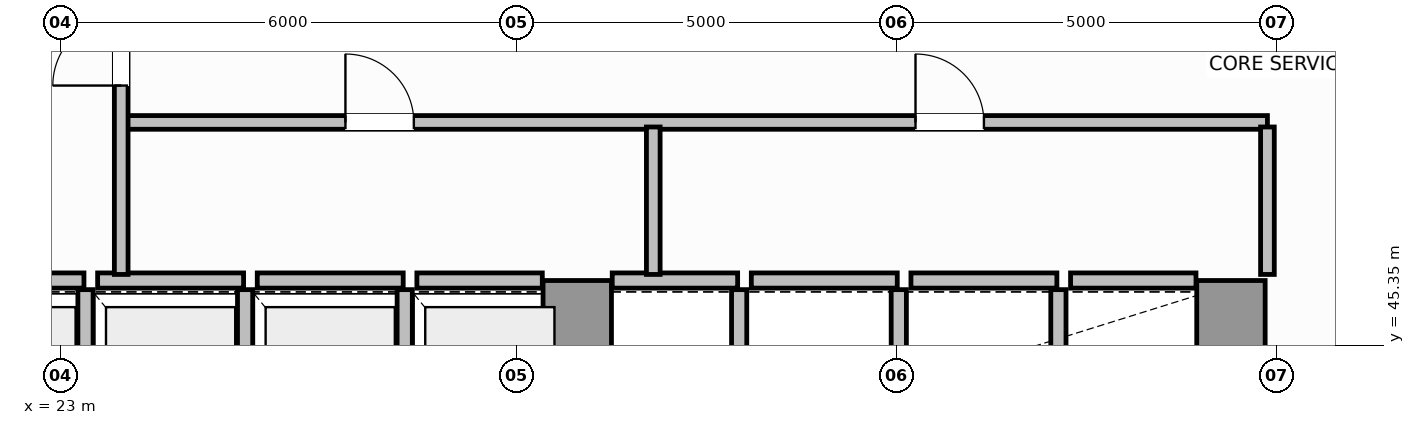
"""IFC4 building model, lengths in metres.
Left out: names, types, materials, properties, quantities, classifications, styles, units other than length and angle.
Written with IfcOpenShell. Run it as: python <this file> out.ifc"""

import sys

from ifc_helpers import new_model, si_unit, direction, frame, frame_2d, origin, place, context, subcontext, project, spatial, rectangle, extrude, source, transform, mapped, element, fill, save


model = new_model("IFC4")
c1 = context("Model", 3, precision=1e-05, world=origin(), true_north=direction((0.0, 1.0)))
c2 = subcontext(c1, "Body", "Model", "MODEL_VIEW")
j1 = project(units=[si_unit("LENGTHUNIT", "METRE"), si_unit("PLANEANGLEUNIT", "RADIAN")], contexts=[c1])
p1 = place(None, origin())
s1 = spatial("IfcSite", under=j1, at=p1, CompositionType="ELEMENT")
p2 = place(p1, origin())
s2 = spatial("IfcBuilding", under=s1, at=p2, CompositionType="ELEMENT")
p3 = place(p2, frame((0.0, 0.0, 60.6)))
s3 = spatial("IfcBuildingStorey", under=s2, at=p3, CompositionType="ELEMENT", Elevation=60.6)
for number, where, z_axis, x_axis in (
    (1, (29.8, 36.97, 0.0), (0.0, 0.0, 1.0), (0.0, 1.0, 0.0)),
    (2, (38.4, 36.97, 0.0), (0.0, 0.0, 1.0), (0.0, 1.0, 0.0)),
):
    element("IfcWall", number, at=place(p3, frame(where, z_axis=z_axis, x_axis=x_axis)), inside=s3, PredefinedType="SHEAR", context=c2, shape_type="SweptSolid", body=[
        extrude(rectangle(XDim=9.23, YDim=0.9, at=frame_2d((4.615, 0.0))), origin(), (0.0, 0.0, 1.0), 3.8),
    ])
p4 = place(p3, frame((21.66, 46.2, 0.0), z_axis=(0.0, 0.0, 1.0), x_axis=(1.0, 0.0, 0.0)))
e3 = element("IfcWall", 3, at=p4, inside=s3, PredefinedType="SOLIDWALL", context=c2, shape_type="SweptSolid", body=[
    extrude(rectangle(XDim=1.65, YDim=0.2, at=frame_2d((0.825, 0.0))), origin(), (0.0, 0.0, 1.0), 3.58),
])
p5 = place(p3, frame((23.33, 43.52, 0.0), z_axis=(0.0, 0.0, 1.0), x_axis=(0.0, 1.0, 0.0)))
e4 = element("IfcWall", 4, at=p5, inside=s3, PredefinedType="SOLIDWALL", context=c2, shape_type="SweptSolid", body=[
    extrude(rectangle(XDim=2.56, YDim=0.2, at=frame_2d((1.28, 0.0))), origin(), (0.0, 0.0, 1.0), 3.58),
])
p6 = place(p3, frame((23.49, 46.2, 0.0), z_axis=(0.0, 0.0, 1.0), x_axis=(1.0, 0.0, 0.0)))
e5 = element("IfcWall", 5, at=p6, inside=s3, PredefinedType="SOLIDWALL", context=c2, shape_type="SweptSolid", body=[
    extrude(rectangle(XDim=1.92, YDim=0.2, at=frame_2d((0.96, 0.0))), origin(), (0.0, 0.0, 1.0), 3.58),
])
p7 = place(p3, frame((25.43, 43.52, 0.0), z_axis=(0.0, 0.0, 1.0), x_axis=(0.0, 1.0, 0.0)))
e6 = element("IfcWall", 6, at=p7, inside=s3, PredefinedType="SOLIDWALL", context=c2, shape_type="SweptSolid", body=[
    extrude(rectangle(XDim=2.56, YDim=0.2, at=frame_2d((1.28, 0.0))), origin(), (0.0, 0.0, 1.0), 3.58),
])
p8 = place(p3, frame((25.59, 46.2, 0.0), z_axis=(0.0, 0.0, 1.0), x_axis=(1.0, 0.0, 0.0)))
e7 = element("IfcWall", 7, at=p8, inside=s3, PredefinedType="SOLIDWALL", context=c2, shape_type="SweptSolid", body=[
    extrude(rectangle(XDim=1.92, YDim=0.2, at=frame_2d((0.96, 0.0))), origin(), (0.0, 0.0, 1.0), 3.58),
])
p9 = place(p3, frame((27.53, 43.52, 0.0), z_axis=(0.0, 0.0, 1.0), x_axis=(0.0, 1.0, 0.0)))
e8 = element("IfcWall", 8, at=p9, inside=s3, PredefinedType="SOLIDWALL", context=c2, shape_type="SweptSolid", body=[
    extrude(rectangle(XDim=2.56, YDim=0.2, at=frame_2d((1.28, 0.0))), origin(), (0.0, 0.0, 1.0), 3.58),
])
p10 = place(p3, frame((27.69, 46.2, 0.0), z_axis=(0.0, 0.0, 1.0), x_axis=(1.0, 0.0, 0.0)))
e9 = element("IfcWall", 9, at=p10, inside=s3, PredefinedType="SOLIDWALL", context=c2, shape_type="SweptSolid", body=[
    extrude(rectangle(XDim=1.65, YDim=0.2, at=frame_2d((0.825, 0.0))), origin(), (0.0, 0.0, 1.0), 3.58),
])
p11 = place(p3, frame((30.26, 46.2, 0.0), z_axis=(0.0, 0.0, 1.0), x_axis=(1.0, 0.0, 0.0)))
e10 = element("IfcWall", 10, at=p11, inside=s3, PredefinedType="SOLIDWALL", context=c2, shape_type="SweptSolid", body=[
    extrude(rectangle(XDim=1.65, YDim=0.2, at=frame_2d((0.825, 0.0))), origin(), (0.0, 0.0, 1.0), 3.58),
])
p12 = place(p3, frame((31.93, 43.52, 0.0), z_axis=(0.0, 0.0, 1.0), x_axis=(0.0, 1.0, 0.0)))
e11 = element("IfcWall", 11, at=p12, inside=s3, PredefinedType="SOLIDWALL", context=c2, shape_type="SweptSolid", body=[
    extrude(rectangle(XDim=2.56, YDim=0.2, at=frame_2d((1.28, 0.0))), origin(), (0.0, 0.0, 1.0), 3.58),
])
p13 = place(p3, frame((32.09, 46.2, 0.0), z_axis=(0.0, 0.0, 1.0), x_axis=(1.0, 0.0, 0.0)))
e12 = element("IfcWall", 12, at=p13, inside=s3, PredefinedType="SOLIDWALL", context=c2, shape_type="SweptSolid", body=[
    extrude(rectangle(XDim=1.92, YDim=0.2, at=frame_2d((0.96, 0.0))), origin(), (0.0, 0.0, 1.0), 3.58),
])
p14 = place(p3, frame((34.03, 43.52, 0.0), z_axis=(0.0, 0.0, 1.0), x_axis=(0.0, 1.0, 0.0)))
e13 = element("IfcWall", 13, at=p14, inside=s3, PredefinedType="SOLIDWALL", context=c2, shape_type="SweptSolid", body=[
    extrude(rectangle(XDim=2.56, YDim=0.2, at=frame_2d((1.28, 0.0))), origin(), (0.0, 0.0, 1.0), 3.58),
])
p15 = place(p3, frame((34.19, 46.2, 0.0), z_axis=(0.0, 0.0, 1.0), x_axis=(1.0, 0.0, 0.0)))
e14 = element("IfcWall", 14, at=p15, inside=s3, PredefinedType="SOLIDWALL", context=c2, shape_type="SweptSolid", body=[
    extrude(rectangle(XDim=1.92, YDim=0.2, at=frame_2d((0.96, 0.0))), origin(), (0.0, 0.0, 1.0), 3.58),
])
p16 = place(p3, frame((36.13, 43.52, 0.0), z_axis=(0.0, 0.0, 1.0), x_axis=(0.0, 1.0, 0.0)))
e15 = element("IfcWall", 15, at=p16, inside=s3, PredefinedType="SOLIDWALL", context=c2, shape_type="SweptSolid", body=[
    extrude(rectangle(XDim=2.56, YDim=0.2, at=frame_2d((1.28, 0.0))), origin(), (0.0, 0.0, 1.0), 3.58),
])
p17 = place(p3, frame((36.29, 46.2, 0.0), z_axis=(0.0, 0.0, 1.0), x_axis=(1.0, 0.0, 0.0)))
e16 = element("IfcWall", 16, at=p17, inside=s3, PredefinedType="SOLIDWALL", context=c2, shape_type="SweptSolid", body=[
    extrude(rectangle(XDim=1.65, YDim=0.2, at=frame_2d((0.825, 0.0))), origin(), (0.0, 0.0, 1.0), 3.58),
])
p18 = place(p3, frame((23.85, 48.28, 0.0), z_axis=(0.0, 0.0, 1.0), x_axis=(1.0, 0.0, 0.0)))
e17 = element("IfcWall", 17, at=p18, inside=s3, PredefinedType="PLUMBINGWALL", context=c2, shape_type="SweptSolid", body=[
    extrude(rectangle(XDim=15.03, YDim=0.18, at=frame_2d((7.515, 0.0))), origin(), (0.0, 0.0, 1.0), 3.58),
])
p19 = place(p18, frame((2.9, 0.0, 0.0)))
e18 = element("IfcOpeningElement", 18, at=p19, cuts=e17, PredefinedType="OPENING", context=c2, shape_type="SweptSolid", body=[
    extrude(rectangle(XDim=0.9, YDim=2.15, at=frame_2d((0.45, 1.075))), frame((0.0, 0.1, 0.0), z_axis=(0.0, -1.0, 0.0), x_axis=(1.0, 0.0, 0.0)), (0.0, 0.0, 1.0), 0.2),
])
p20 = place(p18, frame((10.4, 0.0, 0.0)))
e19 = element("IfcOpeningElement", 19, at=p20, cuts=e17, PredefinedType="OPENING", context=c2, shape_type="SweptSolid", body=[
    extrude(rectangle(XDim=0.9, YDim=2.15, at=frame_2d((0.45, 1.075))), frame((0.0, 0.1, 0.0), z_axis=(0.0, -1.0, 0.0), x_axis=(1.0, 0.0, 0.0)), (0.0, 0.0, 1.0), 0.2),
])
p21 = place(p3, frame((23.8, 46.28, 0.0), z_axis=(0.0, 0.0, 1.0), x_axis=(0.0, 1.0, 0.0)))
e20 = element("IfcWall", 20, at=p21, inside=s3, PredefinedType="PLUMBINGWALL", context=c2, shape_type="SweptSolid", body=[
    extrude(rectangle(XDim=3.8, YDim=0.18, at=frame_2d((1.9, 0.0))), origin(), (0.0, 0.0, 1.0), 3.58),
])
p22 = place(p21, frame((2.485, 0.0, 0.0)))
e21 = element("IfcOpeningElement", 21, at=p22, cuts=e20, PredefinedType="OPENING", context=c2, shape_type="SweptSolid", body=[
    extrude(rectangle(XDim=0.9, YDim=2.15, at=frame_2d((0.45, 1.075))), frame((0.0, 0.1, 0.0), z_axis=(0.0, -1.0, 0.0), x_axis=(1.0, 0.0, 0.0)), (0.0, 0.0, 1.0), 0.2),
])
for number, where, z_axis, x_axis in (
    (22, (30.8, 46.28, 0.0), (0.0, 0.0, 1.0), (0.0, 1.0, 0.0)),
    (23, (38.88, 46.28, 0.0), (0.0, 0.0, 1.0), (0.0, 1.0, 0.0)),
):
    element("IfcWall", number, at=place(p3, frame(where, z_axis=z_axis, x_axis=x_axis)), inside=s3, PredefinedType="PLUMBINGWALL", context=c2, shape_type="SweptSolid", body=[
        extrude(rectangle(XDim=1.94, YDim=0.18, at=frame_2d((0.97, 0.0))), origin(), (0.0, 0.0, 1.0), 3.58),
    ])
m1 = source(origin(), c2, "Body", "SweptSolid", [
    extrude(rectangle(XDim=0.9, YDim=2.15, at=frame_2d((0.45, 1.075))), frame((0.0, 0.025, 0.0), z_axis=(0.0, -1.0, 0.0), x_axis=(1.0, 0.0, 0.0)), (0.0, 0.0, 1.0), 0.05),
])
p23 = place(p22, origin())
e24 = element("IfcDoor", 24, at=p23, inside=s3, OperationType="SINGLE_SWING_LEFT", PredefinedType="DOOR", context=c2, shape_type="MappedRepresentation", body=[
    mapped(m1, transform((0.0, 0.0, 0.0), scale=1.0)),
])
fill(e21, e24)
p24 = place(p19, origin())
e25 = element("IfcDoor", 25, at=p24, inside=s3, OperationType="SINGLE_SWING_RIGHT", PredefinedType="DOOR", context=c2, shape_type="MappedRepresentation", body=[
    mapped(m1, transform((0.0, 0.0, 0.0), scale=1.0)),
])
fill(e18, e25)
p25 = place(p20, origin())
e26 = element("IfcDoor", 26, at=p25, inside=s3, OperationType="SINGLE_SWING_LEFT", PredefinedType="DOOR", context=c2, shape_type="MappedRepresentation", body=[
    mapped(m1, transform((0.0, 0.0, 0.0), scale=1.0)),
])
fill(e19, e26)
save(model, sys.argv[1])
